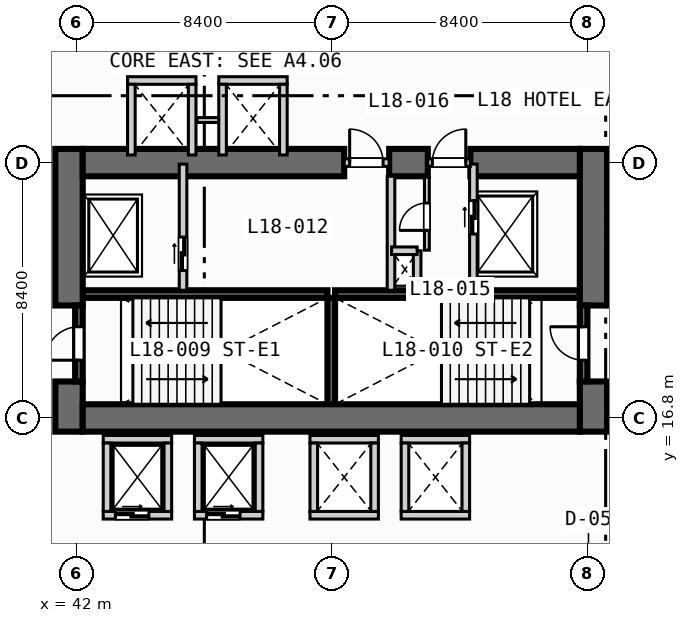
"""IFC4 building model, lengths in metres.
Left out: names, types, materials, properties, quantities, classifications, styles, units other than length and angle.
Written with IfcOpenShell. Run it as: python <this file> out.ifc"""

import sys

from ifc_helpers import new_model, si_unit, direction, frame, frame_2d, origin, place, context, subcontext, project, spatial, rectangle, extrude, element, fill, save


model = new_model("IFC4")
c1 = context("Model", 3, precision=1e-05, world=origin(), true_north=direction((0.0, 1.0)))
c2 = subcontext(c1, "Body", "Model", "MODEL_VIEW")
j1 = project(units=[si_unit("LENGTHUNIT", "METRE"), si_unit("PLANEANGLEUNIT", "RADIAN")], contexts=[c1])
p1 = place(None, origin())
s1 = spatial("IfcSite", under=j1, at=p1, CompositionType="ELEMENT")
p2 = place(p1, origin())
s2 = spatial("IfcBuilding", under=s1, at=p2, CompositionType="ELEMENT")
p3 = place(p2, frame((0.0, 0.0, 77.6)))
s3 = spatial("IfcBuildingStorey", under=s2, at=p3, CompositionType="ELEMENT", Elevation=77.6)
for number, where, z_axis, x_axis in (
    (1, (42.2, 20.875, 0.0), (0.0, 0.0, 1.0), (1.0, 0.0, 0.0)),
    (2, (50.5, 20.875, 0.0), (0.0, 0.0, 1.0), (1.0, 0.0, 0.0)),
):
    element("IfcWall", number, at=place(p3, frame(where, z_axis=z_axis, x_axis=x_axis)), inside=s3, PredefinedType="SOLIDWALL", context=c2, shape_type="SweptSolid", body=[
        extrude(rectangle(XDim=8.05, YDim=0.25, at=frame_2d((4.025, 0.0))), origin(), (0.0, 0.0, 1.0), 3.55),
    ])
p4 = place(p3, frame((50.375, 17.25, 0.0), z_axis=(0.0, 0.0, 1.0), x_axis=(0.0, 1.0, 0.0)))
e3 = element("IfcWall", 3, at=p4, inside=s3, PredefinedType="SOLIDWALL", context=c2, shape_type="SweptSolid", body=[
    extrude(rectangle(XDim=3.5, YDim=0.25, at=frame_2d((1.75, 0.0))), origin(), (0.0, 0.0, 1.0), 3.55),
])
p5 = place(p3, frame((41.75, 16.35, 0.0), z_axis=(0.0, 0.0, 1.0), x_axis=(0.0, 1.0, 0.0)))
e4 = element("IfcWall", 4, at=p5, inside=s3, PredefinedType="SHEAR", context=c2, shape_type="SweptSolid", body=[
    extrude(rectangle(XDim=1.65, YDim=0.9, at=frame_2d((0.825, 0.0))), origin(), (0.0, 0.0, 1.0), 3.55),
])
p6 = place(p3, frame((41.75, 20.5, 0.0), z_axis=(0.0, 0.0, 1.0), x_axis=(0.0, 1.0, 0.0)))
e5 = element("IfcWall", 5, at=p6, inside=s3, PredefinedType="SHEAR", context=c2, shape_type="SweptSolid", body=[
    extrude(rectangle(XDim=5.15, YDim=0.9, at=frame_2d((2.575, 0.0))), origin(), (0.0, 0.0, 1.0), 3.55),
])
p7 = place(p3, frame((59.0, 16.35, 0.0), z_axis=(0.0, 0.0, 1.0), x_axis=(0.0, 1.0, 0.0)))
e6 = element("IfcWall", 6, at=p7, inside=s3, PredefinedType="SHEAR", context=c2, shape_type="SweptSolid", body=[
    extrude(rectangle(XDim=1.65, YDim=0.9, at=frame_2d((0.825, 0.0))), origin(), (0.0, 0.0, 1.0), 3.55),
])
p8 = place(p3, frame((59.0, 20.5, 0.0), z_axis=(0.0, 0.0, 1.0), x_axis=(0.0, 1.0, 0.0)))
e7 = element("IfcWall", 7, at=p8, inside=s3, PredefinedType="SHEAR", context=c2, shape_type="SweptSolid", body=[
    extrude(rectangle(XDim=5.15, YDim=0.9, at=frame_2d((2.575, 0.0))), origin(), (0.0, 0.0, 1.0), 3.55),
])
p9 = place(p3, frame((42.2, 16.8, 0.0), z_axis=(0.0, 0.0, 1.0), x_axis=(1.0, 0.0, 0.0)))
e8 = element("IfcWall", 8, at=p9, inside=s3, PredefinedType="SHEAR", context=c2, shape_type="SweptSolid", body=[
    extrude(rectangle(XDim=16.35, YDim=0.9, at=frame_2d((8.175, 0.0))), origin(), (0.0, 0.0, 1.0), 3.55),
])
p10 = place(p3, frame((42.2, 25.2, 0.0), z_axis=(0.0, 0.0, 1.0), x_axis=(1.0, 0.0, 0.0)))
e9 = element("IfcWall", 9, at=p10, inside=s3, PredefinedType="SHEAR", context=c2, shape_type="SweptSolid", body=[
    extrude(rectangle(XDim=8.6, YDim=0.9, at=frame_2d((4.3, 0.0))), origin(), (0.0, 0.0, 1.0), 3.55),
])
p11 = place(p3, frame((52.28, 25.2, 0.0), z_axis=(0.0, 0.0, 1.0), x_axis=(1.0, 0.0, 0.0)))
e10 = element("IfcWall", 10, at=p11, inside=s3, PredefinedType="SHEAR", context=c2, shape_type="SweptSolid", body=[
    extrude(rectangle(XDim=1.27, YDim=0.9, at=frame_2d((0.635, 0.0))), origin(), (0.0, 0.0, 1.0), 3.55),
])
p12 = place(p3, frame((54.95, 25.2, 0.0), z_axis=(0.0, 0.0, 1.0), x_axis=(1.0, 0.0, 0.0)))
e11 = element("IfcWall", 11, at=p12, inside=s3, PredefinedType="SHEAR", context=c2, shape_type="SweptSolid", body=[
    extrude(rectangle(XDim=3.6, YDim=0.9, at=frame_2d((1.8, 0.0))), origin(), (0.0, 0.0, 1.0), 3.55),
])
p13 = place(p3, frame((42.075, 18.0, 0.0), z_axis=(0.0, 0.0, 1.0), x_axis=(0.0, 1.0, 0.0)))
e12 = element("IfcWall", 12, at=p13, inside=s3, PredefinedType="SOLIDWALL", context=c2, shape_type="SweptSolid", body=[
    extrude(rectangle(XDim=2.5, YDim=0.25, at=frame_2d((1.25, 0.0))), origin(), (0.0, 0.0, 1.0), 3.55),
])
p14 = place(p13, frame((0.7, 0.0, 0.0)))
e13 = element("IfcOpeningElement", 13, at=p14, cuts=e12, PredefinedType="OPENING", context=c2, shape_type="SweptSolid", body=[
    extrude(rectangle(XDim=1.1, YDim=2.15, at=frame_2d((0.55, 1.075))), frame((0.0, 0.135, 0.0), z_axis=(0.0, -1.0, 0.0), x_axis=(1.0, 0.0, 0.0)), (0.0, 0.0, 1.0), 0.27),
])
p15 = place(p3, frame((58.675, 18.0, 0.0), z_axis=(0.0, 0.0, 1.0), x_axis=(0.0, 1.0, 0.0)))
e14 = element("IfcWall", 14, at=p15, inside=s3, PredefinedType="SOLIDWALL", context=c2, shape_type="SweptSolid", body=[
    extrude(rectangle(XDim=2.5, YDim=0.25, at=frame_2d((1.25, 0.0))), origin(), (0.0, 0.0, 1.0), 3.55),
])
p16 = place(p15, frame((0.7, 0.0, 0.0)))
e15 = element("IfcOpeningElement", 15, at=p16, cuts=e14, PredefinedType="OPENING", context=c2, shape_type="SweptSolid", body=[
    extrude(rectangle(XDim=1.1, YDim=2.15, at=frame_2d((0.55, 1.075))), frame((0.0, 0.135, 0.0), z_axis=(0.0, -1.0, 0.0), x_axis=(1.0, 0.0, 0.0)), (0.0, 0.0, 1.0), 0.27),
])
p17 = place(p3, frame((45.5, 21.0, 0.0), z_axis=(0.0, 0.0, 1.0), x_axis=(0.0, 1.0, 0.0)))
e16 = element("IfcWall", 16, at=p17, inside=s3, PredefinedType="SOLIDWALL", context=c2, shape_type="SweptSolid", body=[
    extrude(rectangle(XDim=4.15, YDim=0.25, at=frame_2d((2.075, 0.0))), origin(), (0.0, 0.0, 1.0), 3.55),
])
p18 = place(p17, frame((0.65, 0.0, 0.0)))
e17 = element("IfcOpeningElement", 17, at=p18, cuts=e16, PredefinedType="OPENING", context=c2, shape_type="SweptSolid", body=[
    extrude(rectangle(XDim=1.1, YDim=2.15, at=frame_2d((0.55, 1.075))), frame((0.0, 0.135, 0.0), z_axis=(0.0, -1.0, 0.0), x_axis=(1.0, 0.0, 0.0)), (0.0, 0.0, 1.0), 0.27),
])
p19 = place(p3, frame((50.8, 25.2, 0.0), z_axis=(0.0, 0.0, 1.0), x_axis=(1.0, 0.0, 0.0)))
e18 = element("IfcWall", 18, at=p19, inside=s3, PredefinedType="SOLIDWALL", context=c2, shape_type="SweptSolid", body=[
    extrude(rectangle(XDim=1.48, YDim=0.25, at=frame_2d((0.74, 0.0))), origin(), (0.0, 0.0, 1.0), 3.55),
])
p20 = place(p19, frame((0.18, 0.0, 0.0)))
e19 = element("IfcOpeningElement", 19, at=p20, cuts=e18, PredefinedType="OPENING", context=c2, shape_type="SweptSolid", body=[
    extrude(rectangle(XDim=1.1, YDim=2.15, at=frame_2d((0.55, 1.075))), frame((0.0, 0.135, 0.0), z_axis=(0.0, -1.0, 0.0), x_axis=(1.0, 0.0, 0.0)), (0.0, 0.0, 1.0), 0.27),
])
p21 = place(p3, frame((52.34, 21.0, 0.0), z_axis=(0.0, 0.0, 1.0), x_axis=(0.0, 1.0, 0.0)))
e20 = element("IfcWall", 20, at=p21, inside=s3, PredefinedType="SOLIDWALL", context=c2, shape_type="SweptSolid", body=[
    extrude(rectangle(XDim=3.75, YDim=0.25, at=frame_2d((1.875, 0.0))), origin(), (0.0, 0.0, 1.0), 3.55),
])
p22 = place(p3, frame((55.05, 21.0, 0.0), z_axis=(0.0, 0.0, 1.0), x_axis=(0.0, 1.0, 0.0)))
e21 = element("IfcWall", 21, at=p22, inside=s3, PredefinedType="SOLIDWALL", context=c2, shape_type="SweptSolid", body=[
    extrude(rectangle(XDim=4.15, YDim=0.25, at=frame_2d((2.075, 0.0))), origin(), (0.0, 0.0, 1.0), 3.55),
])
p23 = place(p22, frame((1.85, 0.0, 0.0)))
e22 = element("IfcOpeningElement", 22, at=p23, cuts=e21, PredefinedType="OPENING", context=c2, shape_type="SweptSolid", body=[
    extrude(rectangle(XDim=1.1, YDim=2.15, at=frame_2d((0.55, 1.075))), frame((0.0, 0.135, 0.0), z_axis=(0.0, -1.0, 0.0), x_axis=(1.0, 0.0, 0.0)), (0.0, 0.0, 1.0), 0.27),
])
p24 = place(p3, frame((53.55, 25.2, 0.0), z_axis=(0.0, 0.0, 1.0), x_axis=(1.0, 0.0, 0.0)))
e23 = element("IfcWall", 23, at=p24, inside=s3, PredefinedType="SOLIDWALL", context=c2, shape_type="SweptSolid", body=[
    extrude(rectangle(XDim=1.4, YDim=0.25, at=frame_2d((0.7, 0.0))), origin(), (0.0, 0.0, 1.0), 3.55),
])
p25 = place(p24, frame((0.15, 0.0, 0.0)))
e24 = element("IfcOpeningElement", 24, at=p25, cuts=e23, PredefinedType="OPENING", context=c2, shape_type="SweptSolid", body=[
    extrude(rectangle(XDim=1.1, YDim=2.15, at=frame_2d((0.55, 1.075))), frame((0.0, 0.135, 0.0), z_axis=(0.0, -1.0, 0.0), x_axis=(1.0, 0.0, 0.0)), (0.0, 0.0, 1.0), 0.27),
])
p26 = place(p3, frame((53.2, 21.0, 0.0), z_axis=(0.0, 0.0, 1.0), x_axis=(0.0, 1.0, 0.0)))
e25 = element("IfcWall", 25, at=p26, inside=s3, PredefinedType="SOLIDWALL", context=c2, shape_type="SweptSolid", body=[
    extrude(rectangle(XDim=1.3, YDim=0.25, at=frame_2d((0.65, 0.0))), origin(), (0.0, 0.0, 1.0), 3.55),
])
p27 = place(p3, frame((52.36, 22.3, 0.0), z_axis=(0.0, 0.0, 1.0), x_axis=(1.0, 0.0, 0.0)))
e26 = element("IfcWall", 26, at=p27, inside=s3, PredefinedType="SOLIDWALL", context=c2, shape_type="SweptSolid", body=[
    extrude(rectangle(XDim=0.84, YDim=0.25, at=frame_2d((0.42, 0.0))), origin(), (0.0, 0.0, 1.0), 3.55),
])
p28 = place(p3, frame((53.52, 22.32, 0.0), z_axis=(0.0, 0.0, 1.0), x_axis=(0.0, 1.0, 0.0)))
e27 = element("IfcWall", 27, at=p28, inside=s3, PredefinedType="PARTITIONING", context=c2, shape_type="SweptSolid", body=[
    extrude(rectangle(XDim=2.4, YDim=0.16, at=frame_2d((1.2, 0.0))), origin(), (0.0, 0.0, 1.0), 3.55),
])
p29 = place(p28, frame((0.65, 0.0, 0.0)))
e28 = element("IfcOpeningElement", 28, at=p29, cuts=e27, PredefinedType="OPENING", context=c2, shape_type="SweptSolid", body=[
    extrude(rectangle(XDim=0.9, YDim=2.1, at=frame_2d((0.45, 1.05))), frame((0.0, 0.09, 0.0), z_axis=(0.0, -1.0, 0.0), x_axis=(1.0, 0.0, 0.0)), (0.0, 0.0, 1.0), 0.18),
])
p30 = place(p3, frame((42.875, 13.6, 0.0), z_axis=(0.0, 0.0, 1.0), x_axis=(1.0, 0.0, 0.0)))
e29 = element("IfcWall", 29, at=p30, inside=s3, PredefinedType="SOLIDWALL", context=c2, shape_type="SweptSolid", body=[
    extrude(rectangle(XDim=2.25, YDim=0.25, at=frame_2d((1.125, 0.0))), origin(), (0.0, 0.0, 1.0), 3.55),
])
p31 = place(p30, frame((0.4, 0.0, 0.0)))
e30 = element("IfcOpeningElement", 30, at=p31, cuts=e29, PredefinedType="OPENING", context=c2, shape_type="SweptSolid", body=[
    extrude(rectangle(XDim=1.1, YDim=2.15, at=frame_2d((0.55, 1.075))), frame((0.0, 0.135, 0.0), z_axis=(0.0, -1.0, 0.0), x_axis=(1.0, 0.0, 0.0)), (0.0, 0.0, 1.0), 0.27),
])
for number, where, z_axis, x_axis in (
    (31, (42.875, 16.1, 0.0), (0.0, 0.0, 1.0), (1.0, 0.0, 0.0)),
    (32, (43.0, 13.725, 0.0), (0.0, 0.0, 1.0), (0.0, 1.0, 0.0)),
    (33, (45.0, 13.725, 0.0), (0.0, 0.0, 1.0), (0.0, 1.0, 0.0)),
):
    element("IfcWall", number, at=place(p3, frame(where, z_axis=z_axis, x_axis=x_axis)), inside=s3, PredefinedType="SOLIDWALL", context=c2, shape_type="SweptSolid", body=[
        extrude(rectangle(XDim=2.25, YDim=0.25, at=frame_2d((1.125, 0.0))), origin(), (0.0, 0.0, 1.0), 3.55),
    ])
p32 = place(p3, frame((45.875, 13.6, 0.0), z_axis=(0.0, 0.0, 1.0), x_axis=(1.0, 0.0, 0.0)))
e34 = element("IfcWall", 34, at=p32, inside=s3, PredefinedType="SOLIDWALL", context=c2, shape_type="SweptSolid", body=[
    extrude(rectangle(XDim=2.25, YDim=0.25, at=frame_2d((1.125, 0.0))), origin(), (0.0, 0.0, 1.0), 3.55),
])
p33 = place(p32, frame((0.4, 0.0, 0.0)))
e35 = element("IfcOpeningElement", 35, at=p33, cuts=e34, PredefinedType="OPENING", context=c2, shape_type="SweptSolid", body=[
    extrude(rectangle(XDim=1.1, YDim=2.15, at=frame_2d((0.55, 1.075))), frame((0.0, 0.135, 0.0), z_axis=(0.0, -1.0, 0.0), x_axis=(1.0, 0.0, 0.0)), (0.0, 0.0, 1.0), 0.27),
])
for number, where, z_axis, x_axis in (
    (36, (45.875, 16.1, 0.0), (0.0, 0.0, 1.0), (1.0, 0.0, 0.0)),
    (37, (46.0, 13.725, 0.0), (0.0, 0.0, 1.0), (0.0, 1.0, 0.0)),
    (38, (48.0, 13.725, 0.0), (0.0, 0.0, 1.0), (0.0, 1.0, 0.0)),
    (39, (49.675, 13.6, 0.0), (0.0, 0.0, 1.0), (1.0, 0.0, 0.0)),
    (40, (49.675, 16.1, 0.0), (0.0, 0.0, 1.0), (1.0, 0.0, 0.0)),
    (41, (49.8, 13.725, 0.0), (0.0, 0.0, 1.0), (0.0, 1.0, 0.0)),
    (42, (51.8, 13.725, 0.0), (0.0, 0.0, 1.0), (0.0, 1.0, 0.0)),
    (43, (52.675, 13.6, 0.0), (0.0, 0.0, 1.0), (1.0, 0.0, 0.0)),
    (44, (52.675, 16.1, 0.0), (0.0, 0.0, 1.0), (1.0, 0.0, 0.0)),
    (45, (52.8, 13.725, 0.0), (0.0, 0.0, 1.0), (0.0, 1.0, 0.0)),
    (46, (54.8, 13.725, 0.0), (0.0, 0.0, 1.0), (0.0, 1.0, 0.0)),
    (47, (43.675, 27.9, 0.0), (0.0, 0.0, 1.0), (1.0, 0.0, 0.0)),
):
    element("IfcWall", number, at=place(p3, frame(where, z_axis=z_axis, x_axis=x_axis)), inside=s3, PredefinedType="SOLIDWALL", context=c2, shape_type="SweptSolid", body=[
        extrude(rectangle(XDim=2.25, YDim=0.25, at=frame_2d((1.125, 0.0))), origin(), (0.0, 0.0, 1.0), 3.55),
    ])
for number, where, z_axis, x_axis in (
    (48, (43.8, 25.45, 0.0), (0.0, 0.0, 1.0), (0.0, 1.0, 0.0)),
    (49, (45.8, 25.45, 0.0), (0.0, 0.0, 1.0), (0.0, 1.0, 0.0)),
):
    element("IfcWall", number, at=place(p3, frame(where, z_axis=z_axis, x_axis=x_axis)), inside=s3, PredefinedType="SOLIDWALL", context=c2, shape_type="SweptSolid", body=[
        extrude(rectangle(XDim=2.325, YDim=0.25, at=frame_2d((1.163, 0.0))), origin(), (0.0, 0.0, 1.0), 3.55),
    ])
p34 = place(p3, frame((45.96, 26.6, 0.0), z_axis=(0.0, 0.0, 1.0), x_axis=(1.0, 0.0, 0.0)))
e50 = element("IfcWall", 50, at=p34, inside=s3, PredefinedType="PARTITIONING", context=c2, shape_type="SweptSolid", body=[
    extrude(rectangle(XDim=0.88, YDim=0.16, at=frame_2d((0.44, 0.0))), origin(), (0.0, 0.0, 1.0), 3.55),
])
p35 = place(p3, frame((46.675, 27.9, 0.0), z_axis=(0.0, 0.0, 1.0), x_axis=(1.0, 0.0, 0.0)))
e51 = element("IfcWall", 51, at=p35, inside=s3, PredefinedType="SOLIDWALL", context=c2, shape_type="SweptSolid", body=[
    extrude(rectangle(XDim=2.25, YDim=0.25, at=frame_2d((1.125, 0.0))), origin(), (0.0, 0.0, 1.0), 3.55),
])
for number, where, z_axis, x_axis in (
    (52, (46.8, 25.45, 0.0), (0.0, 0.0, 1.0), (0.0, 1.0, 0.0)),
    (53, (48.8, 25.45, 0.0), (0.0, 0.0, 1.0), (0.0, 1.0, 0.0)),
):
    element("IfcWall", number, at=place(p3, frame(where, z_axis=z_axis, x_axis=x_axis)), inside=s3, PredefinedType="SOLIDWALL", context=c2, shape_type="SweptSolid", body=[
        extrude(rectangle(XDim=2.325, YDim=0.25, at=frame_2d((1.163, 0.0))), origin(), (0.0, 0.0, 1.0), 3.55),
    ])
p36 = place(p14, origin())
e54 = element("IfcDoor", 54, at=p36, inside=s3, OperationType="SINGLE_SWING_LEFT", PredefinedType="DOOR", context=c2, shape_type="SweptSolid", body=[
    extrude(rectangle(XDim=1.1, YDim=2.15, at=frame_2d((0.55, 1.075))), frame((0.0, 0.025, 0.0), z_axis=(0.0, -1.0, 0.0), x_axis=(1.0, 0.0, 0.0)), (0.0, 0.0, 1.0), 0.05),
])
fill(e13, e54)
p37 = place(p16, origin())
e55 = element("IfcDoor", 55, at=p37, inside=s3, OperationType="SINGLE_SWING_RIGHT", PredefinedType="DOOR", context=c2, shape_type="SweptSolid", body=[
    extrude(rectangle(XDim=1.1, YDim=2.15, at=frame_2d((0.55, 1.075))), frame((0.0, 0.025, 0.0), z_axis=(0.0, -1.0, 0.0), x_axis=(1.0, 0.0, 0.0)), (0.0, 0.0, 1.0), 0.05),
])
fill(e15, e55)
p38 = place(p18, origin())
e56 = element("IfcDoor", 56, at=p38, inside=s3, OperationType="SLIDING_TO_LEFT", PredefinedType="DOOR", context=c2, shape_type="SweptSolid", body=[
    extrude(rectangle(XDim=1.1, YDim=2.15, at=frame_2d((0.55, 1.075))), frame((0.0, 0.025, 0.0), z_axis=(0.0, -1.0, 0.0), x_axis=(1.0, 0.0, 0.0)), (0.0, 0.0, 1.0), 0.05),
])
fill(e17, e56)
p39 = place(p20, origin())
e57 = element("IfcDoor", 57, at=p39, inside=s3, OperationType="SINGLE_SWING_LEFT", PredefinedType="DOOR", context=c2, shape_type="SweptSolid", body=[
    extrude(rectangle(XDim=1.1, YDim=2.15, at=frame_2d((0.55, 1.075))), frame((0.0, 0.025, 0.0), z_axis=(0.0, -1.0, 0.0), x_axis=(1.0, 0.0, 0.0)), (0.0, 0.0, 1.0), 0.05),
])
fill(e19, e57)
p40 = place(p23, origin())
e58 = element("IfcDoor", 58, at=p40, inside=s3, OperationType="SLIDING_TO_LEFT", PredefinedType="DOOR", context=c2, shape_type="SweptSolid", body=[
    extrude(rectangle(XDim=1.1, YDim=2.15, at=frame_2d((0.55, 1.075))), frame((0.0, 0.025, 0.0), z_axis=(0.0, -1.0, 0.0), x_axis=(1.0, 0.0, 0.0)), (0.0, 0.0, 1.0), 0.05),
])
fill(e22, e58)
p41 = place(p25, origin())
e59 = element("IfcDoor", 59, at=p41, inside=s3, OperationType="SINGLE_SWING_RIGHT", PredefinedType="DOOR", context=c2, shape_type="SweptSolid", body=[
    extrude(rectangle(XDim=1.1, YDim=2.15, at=frame_2d((0.55, 1.075))), frame((0.0, 0.025, 0.0), z_axis=(0.0, -1.0, 0.0), x_axis=(1.0, 0.0, 0.0)), (0.0, 0.0, 1.0), 0.05),
])
fill(e24, e59)
p42 = place(p29, origin())
e60 = element("IfcDoor", 60, at=p42, inside=s3, OperationType="SINGLE_SWING_LEFT", PredefinedType="DOOR", context=c2, shape_type="SweptSolid", body=[
    extrude(rectangle(XDim=0.9, YDim=2.1, at=frame_2d((0.45, 1.05))), frame((0.0, 0.025, 0.0), z_axis=(0.0, -1.0, 0.0), x_axis=(1.0, 0.0, 0.0)), (0.0, 0.0, 1.0), 0.05),
])
fill(e28, e60)
p43 = place(p31, origin())
e61 = element("IfcDoor", 61, at=p43, inside=s3, OperationType="SLIDING_TO_LEFT", PredefinedType="DOOR", context=c2, shape_type="SweptSolid", body=[
    extrude(rectangle(XDim=1.1, YDim=2.15, at=frame_2d((0.55, 1.075))), frame((0.0, 0.025, 0.0), z_axis=(0.0, -1.0, 0.0), x_axis=(1.0, 0.0, 0.0)), (0.0, 0.0, 1.0), 0.05),
])
fill(e30, e61)
p44 = place(p33, origin())
e62 = element("IfcDoor", 62, at=p44, inside=s3, OperationType="SLIDING_TO_LEFT", PredefinedType="DOOR", context=c2, shape_type="SweptSolid", body=[
    extrude(rectangle(XDim=1.1, YDim=2.15, at=frame_2d((0.55, 1.075))), frame((0.0, 0.025, 0.0), z_axis=(0.0, -1.0, 0.0), x_axis=(1.0, 0.0, 0.0)), (0.0, 0.0, 1.0), 0.05),
])
fill(e35, e62)
save(model, sys.argv[1])
